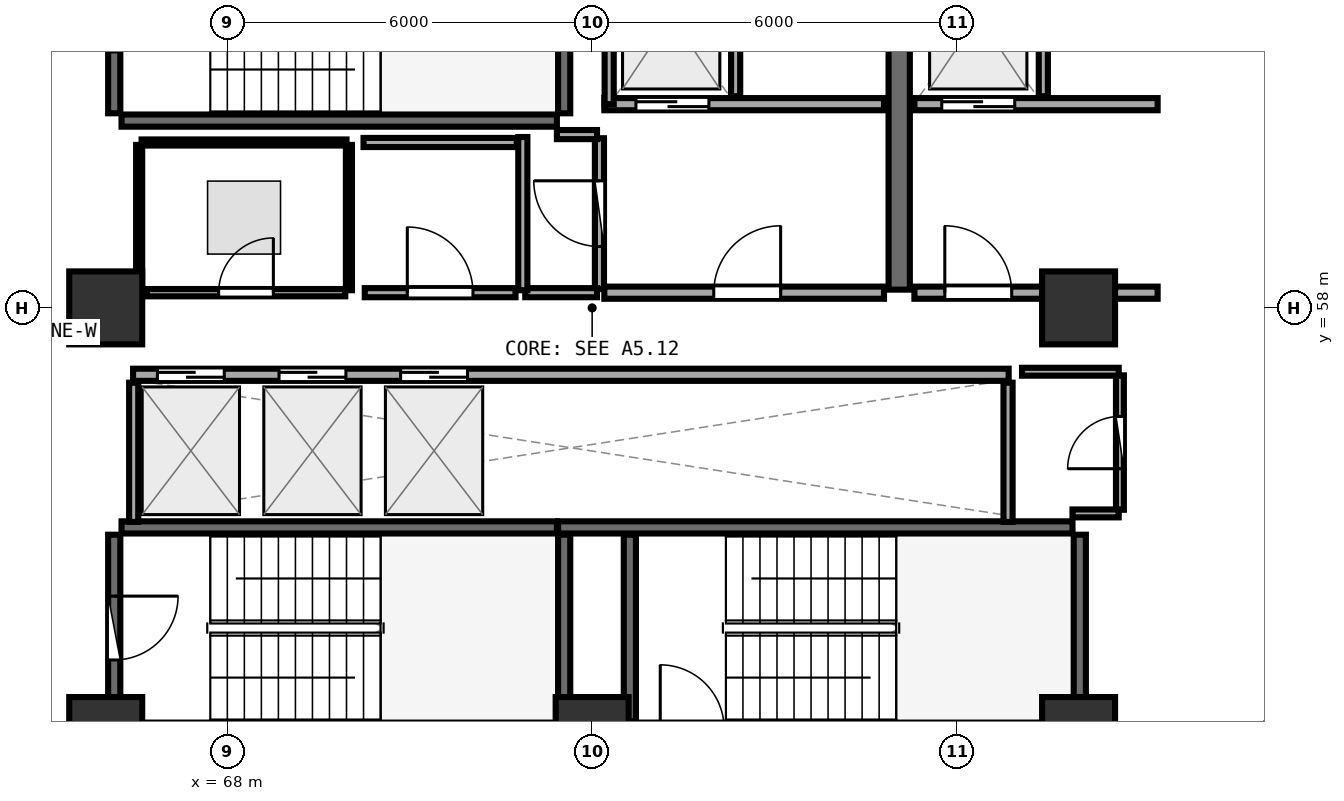
"""IFC4 building model, lengths in metres.
Left out: names, types, materials, properties, quantities, classifications, styles, units other than length and angle.
Written with IfcOpenShell. Run it as: python <this file> out.ifc"""

import sys

from ifc_helpers import new_model, si_unit, direction, frame, frame_2d, origin, origin_2d, place, context, subcontext, project, spatial, rectangle, extrude, element, fill, save


model = new_model("IFC4")
c1 = context("Model", 3, precision=1e-05, world=origin(), true_north=direction((0.0, 1.0)))
c2 = subcontext(c1, "Body", "Model", "MODEL_VIEW")
j1 = project(units=[si_unit("LENGTHUNIT", "METRE"), si_unit("PLANEANGLEUNIT", "RADIAN")], contexts=[c1])
p1 = place(None, origin())
s1 = spatial("IfcSite", under=j1, at=p1, CompositionType="ELEMENT")
p2 = place(p1, origin())
s2 = spatial("IfcBuilding", under=s1, at=p2, CompositionType="ELEMENT")
p3 = place(p2, frame((0.0, 0.0, 165.6)))
s3 = spatial("IfcBuildingStorey", under=s2, at=p3, CompositionType="ELEMENT", Elevation=165.6)
for number, where, z_axis, x_axis in (
    (1, (66.0, 51.0, 0.0), (0.0, 0.0, 1.0), (1.0, 0.0, 0.0)),
    (2, (74.0, 51.0, 0.0), (0.0, 0.0, 1.0), (1.0, 0.0, 0.0)),
    (3, (82.0, 51.0, 0.0), (0.0, 0.0, 1.0), (1.0, 0.0, 0.0)),
    (4, (82.0, 58.0, 0.0), (0.0, 0.0, 1.0), (1.0, 0.0, 0.0)),
    (5, (66.0, 58.0, 0.0), (0.0, 0.0, 1.0), (1.0, 0.0, 0.0)),
):
    element("IfcColumn", number, at=place(p3, frame(where, z_axis=z_axis, x_axis=x_axis)), inside=s3, PredefinedType="PILASTER", context=c2, shape_type="SweptSolid", body=[
        extrude(rectangle(XDim=1.2, YDim=1.2, at=origin_2d()), origin(), (0.0, 0.0, 1.0), 3.75),
    ])
p4 = place(p3, frame((66.26, 61.08, 0.0), z_axis=(0.0, 0.0, 1.0), x_axis=(1.0, 0.0, 0.0)))
e6 = element("IfcWall", 6, at=p4, inside=s3, PredefinedType="SHEAR", context=c2, shape_type="SweptSolid", body=[
    extrude(rectangle(XDim=7.16, YDim=0.2, at=frame_2d((3.58, 0.0))), origin(), (0.0, 0.0, 1.0), 3.49),
])
p5 = place(p3, frame((73.54, 61.2, 0.0), z_axis=(0.0, 0.0, 1.0), x_axis=(0.0, 1.0, 0.0)))
e7 = element("IfcWall", 7, at=p5, inside=s3, PredefinedType="SHEAR", context=c2, shape_type="SweptSolid", body=[
    extrude(rectangle(XDim=3.07, YDim=0.2, at=frame_2d((1.535, 0.0))), origin(), (0.0, 0.0, 1.0), 3.49),
])
p6 = place(p3, frame((66.14, 64.27, 0.0), z_axis=(0.0, 0.0, 1.0), x_axis=(0.0, -1.0, 0.0)))
e8 = element("IfcWall", 8, at=p6, inside=s3, PredefinedType="SHEAR", context=c2, shape_type="SweptSolid", body=[
    extrude(rectangle(XDim=3.07, YDim=0.2, at=frame_2d((1.535, 0.0))), origin(), (0.0, 0.0, 1.0), 3.49),
])
p7 = place(p6, frame((1.01, 0.0, 0.0)))
e9 = element("IfcOpeningElement", 9, at=p7, cuts=e8, PredefinedType="OPENING", context=c2, shape_type="SweptSolid", body=[
    extrude(rectangle(XDim=1.05, YDim=2.1, at=frame_2d((0.525, 1.05))), frame((0.0, 0.11, 0.0), z_axis=(0.0, -1.0, 0.0), x_axis=(1.0, 0.0, 0.0)), (0.0, 0.0, 1.0), 0.22),
])
p8 = place(p3, frame((82.02, 51.2, 0.0), z_axis=(0.0, 0.0, 1.0), x_axis=(0.0, 1.0, 0.0)))
e10 = element("IfcWall", 10, at=p8, inside=s3, PredefinedType="SHEAR", context=c2, shape_type="SweptSolid", body=[
    extrude(rectangle(XDim=3.07, YDim=0.2, at=frame_2d((1.535, 0.0))), origin(), (0.0, 0.0, 1.0), 3.49),
])
p9 = place(p3, frame((81.9, 54.39, 0.0), z_axis=(0.0, 0.0, 1.0), x_axis=(-1.0, 0.0, 0.0)))
e11 = element("IfcWall", 11, at=p9, inside=s3, PredefinedType="SHEAR", context=c2, shape_type="SweptSolid", body=[
    extrude(rectangle(XDim=8.46, YDim=0.2, at=frame_2d((4.23, 0.0))), origin(), (0.0, 0.0, 1.0), 3.49),
])
for number, where, z_axis, x_axis in (
    (12, (74.62, 54.27, 0.0), (0.0, 0.0, 1.0), (0.0, -1.0, 0.0)),
    (13, (73.54, 51.2, 0.0), (0.0, 0.0, 1.0), (0.0, 1.0, 0.0)),
):
    element("IfcWall", number, at=place(p3, frame(where, z_axis=z_axis, x_axis=x_axis)), inside=s3, PredefinedType="SHEAR", context=c2, shape_type="SweptSolid", body=[
        extrude(rectangle(XDim=3.07, YDim=0.2, at=frame_2d((1.535, 0.0))), origin(), (0.0, 0.0, 1.0), 3.49),
    ])
p10 = place(p3, frame((73.42, 54.39, 0.0), z_axis=(0.0, 0.0, 1.0), x_axis=(-1.0, 0.0, 0.0)))
e14 = element("IfcWall", 14, at=p10, inside=s3, PredefinedType="SHEAR", context=c2, shape_type="SweptSolid", body=[
    extrude(rectangle(XDim=7.16, YDim=0.2, at=frame_2d((3.58, 0.0))), origin(), (0.0, 0.0, 1.0), 3.49),
])
p11 = place(p3, frame((66.14, 54.27, 0.0), z_axis=(0.0, 0.0, 1.0), x_axis=(0.0, -1.0, 0.0)))
e15 = element("IfcWall", 15, at=p11, inside=s3, PredefinedType="SHEAR", context=c2, shape_type="SweptSolid", body=[
    extrude(rectangle(XDim=3.07, YDim=0.2, at=frame_2d((1.535, 0.0))), origin(), (0.0, 0.0, 1.0), 3.49),
])
p12 = place(p11, frame((1.01, 0.0, 0.0)))
e16 = element("IfcOpeningElement", 16, at=p12, cuts=e15, PredefinedType="OPENING", context=c2, shape_type="SweptSolid", body=[
    extrude(rectangle(XDim=1.05, YDim=2.1, at=frame_2d((0.525, 1.05))), frame((0.0, 0.11, 0.0), z_axis=(0.0, -1.0, 0.0), x_axis=(1.0, 0.0, 0.0)), (0.0, 0.0, 1.0), 0.22),
])
p13 = place(p3, frame((79.05, 58.3, 0.0), z_axis=(0.0, 0.0, 1.0), x_axis=(0.0, 1.0, 0.0)))
e17 = element("IfcWall", 17, at=p13, inside=s3, PredefinedType="SHEAR", context=c2, shape_type="SweptSolid", body=[
    extrude(rectangle(XDim=6.3, YDim=0.35, at=frame_2d((3.15, 0.0))), origin(), (0.0, 0.0, 1.0), 3.49),
])
p14 = place(p3, frame((74.2, 61.35, 0.0), z_axis=(0.0, 0.0, 1.0), x_axis=(1.0, 0.0, 0.0)))
e18 = element("IfcWall", 18, at=p14, inside=s3, PredefinedType="SOLIDWALL", context=c2, shape_type="SweptSolid", body=[
    extrude(rectangle(XDim=4.6, YDim=0.2, at=frame_2d((2.3, 0.0))), origin(), (0.0, 0.0, 1.0), 3.48),
])
p15 = place(p14, frame((0.52, 0.0, 0.0)))
e19 = element("IfcOpeningElement", 19, at=p15, cuts=e18, PredefinedType="OPENING", context=c2, shape_type="SweptSolid", body=[
    extrude(rectangle(XDim=1.2, YDim=2.15, at=frame_2d((0.6, 1.075))), frame((0.0, 0.11, 0.0), z_axis=(0.0, -1.0, 0.0), x_axis=(1.0, 0.0, 0.0)), (0.0, 0.0, 1.0), 0.22),
])
p16 = place(p3, frame((74.28, 61.35, 0.0), z_axis=(0.0, 0.0, 1.0), x_axis=(0.0, 1.0, 0.0)))
e20 = element("IfcWall", 20, at=p16, inside=s3, PredefinedType="PARTITIONING", context=c2, shape_type="SweptSolid", body=[
    extrude(rectangle(XDim=2.97, YDim=0.15, at=frame_2d((1.485, 0.0))), origin(), (0.0, 0.0, 1.0), 3.48),
])
p17 = place(p3, frame((76.36, 61.48, 0.0), z_axis=(0.0, 0.0, 1.0), x_axis=(0.0, 1.0, 0.0)))
e21 = element("IfcWall", 21, at=p17, inside=s3, PredefinedType="PARTITIONING", context=c2, shape_type="SweptSolid", body=[
    extrude(rectangle(XDim=2.84, YDim=0.15, at=frame_2d((1.42, 0.0))), origin(), (0.0, 0.0, 1.0), 3.48),
])
p18 = place(p3, frame((79.3, 61.35, 0.0), z_axis=(0.0, 0.0, 1.0), x_axis=(1.0, 0.0, 0.0)))
e22 = element("IfcWall", 22, at=p18, inside=s3, PredefinedType="SOLIDWALL", context=c2, shape_type="SweptSolid", body=[
    extrude(rectangle(XDim=4.0, YDim=0.2, at=frame_2d((2.0, 0.0))), origin(), (0.0, 0.0, 1.0), 2.775),
])
p19 = place(p18, frame((0.45, 0.0, 0.0)))
e23 = element("IfcOpeningElement", 23, at=p19, cuts=e22, PredefinedType="OPENING", context=c2, shape_type="SweptSolid", body=[
    extrude(rectangle(XDim=1.2, YDim=2.15, at=frame_2d((0.6, 1.075))), frame((0.0, 0.11, 0.0), z_axis=(0.0, -1.0, 0.0), x_axis=(1.0, 0.0, 0.0)), (0.0, 0.0, 1.0), 0.22),
])
p20 = place(p3, frame((81.42, 61.48, 0.0), z_axis=(0.0, 0.0, 1.0), x_axis=(0.0, 1.0, 0.0)))
e24 = element("IfcWall", 24, at=p20, inside=s3, PredefinedType="PARTITIONING", context=c2, shape_type="SweptSolid", body=[
    extrude(rectangle(XDim=2.84, YDim=0.15, at=frame_2d((1.42, 0.0))), origin(), (0.0, 0.0, 1.0), 3.48),
])
p21 = place(p3, frame((74.2, 58.25, 0.0), z_axis=(0.0, 0.0, 1.0), x_axis=(1.0, 0.0, 0.0)))
e25 = element("IfcWall", 25, at=p21, inside=s3, PredefinedType="SOLIDWALL", context=c2, shape_type="SweptSolid", body=[
    extrude(rectangle(XDim=4.6, YDim=0.2, at=frame_2d((2.3, 0.0))), origin(), (0.0, 0.0, 1.0), 3.48),
])
p22 = place(p21, frame((1.8, 0.0, 0.0)))
e26 = element("IfcOpeningElement", 26, at=p22, cuts=e25, PredefinedType="OPENING", context=c2, shape_type="SweptSolid", body=[
    extrude(rectangle(XDim=1.1, YDim=2.1, at=frame_2d((0.55, 1.05))), frame((0.0, 0.11, 0.0), z_axis=(0.0, -1.0, 0.0), x_axis=(1.0, 0.0, 0.0)), (0.0, 0.0, 1.0), 0.22),
])
p23 = place(p3, frame((79.3, 58.25, 0.0), z_axis=(0.0, 0.0, 1.0), x_axis=(1.0, 0.0, 0.0)))
e27 = element("IfcWall", 27, at=p23, inside=s3, PredefinedType="SOLIDWALL", context=c2, shape_type="SweptSolid", body=[
    extrude(rectangle(XDim=4.0, YDim=0.2, at=frame_2d((2.0, 0.0))), origin(), (0.0, 0.0, 1.0), 2.775),
])
p24 = place(p23, frame((0.5, 0.0, 0.0)))
e28 = element("IfcOpeningElement", 28, at=p24, cuts=e27, PredefinedType="OPENING", context=c2, shape_type="SweptSolid", body=[
    extrude(rectangle(XDim=1.1, YDim=2.1, at=frame_2d((0.55, 1.05))), frame((0.0, 0.11, 0.0), z_axis=(0.0, -1.0, 0.0), x_axis=(1.0, 0.0, 0.0)), (0.0, 0.0, 1.0), 0.22),
])
p25 = place(p3, frame((66.45, 56.9, 0.0), z_axis=(0.0, 0.0, 1.0), x_axis=(1.0, 0.0, 0.0)))
e29 = element("IfcWall", 29, at=p25, inside=s3, PredefinedType="SOLIDWALL", context=c2, shape_type="SweptSolid", body=[
    extrude(rectangle(XDim=14.4, YDim=0.2, at=frame_2d((7.2, 0.0))), origin(), (0.0, 0.0, 1.0), 3.48),
])
p26 = place(p25, frame((0.4, 0.0, 0.0)))
e30 = element("IfcOpeningElement", 30, at=p26, cuts=e29, PredefinedType="OPENING", context=c2, shape_type="SweptSolid", body=[
    extrude(rectangle(XDim=1.1, YDim=2.1, at=frame_2d((0.55, 1.05))), frame((0.0, 0.11, 0.0), z_axis=(0.0, -1.0, 0.0), x_axis=(1.0, 0.0, 0.0)), (0.0, 0.0, 1.0), 0.22),
])
p27 = place(p25, frame((2.4, 0.0, 0.0)))
e31 = element("IfcOpeningElement", 31, at=p27, cuts=e29, PredefinedType="OPENING", context=c2, shape_type="SweptSolid", body=[
    extrude(rectangle(XDim=1.1, YDim=2.1, at=frame_2d((0.55, 1.05))), frame((0.0, 0.11, 0.0), z_axis=(0.0, -1.0, 0.0), x_axis=(1.0, 0.0, 0.0)), (0.0, 0.0, 1.0), 0.22),
])
p28 = place(p25, frame((4.4, 0.0, 0.0)))
e32 = element("IfcOpeningElement", 32, at=p28, cuts=e29, PredefinedType="OPENING", context=c2, shape_type="SweptSolid", body=[
    extrude(rectangle(XDim=1.1, YDim=2.1, at=frame_2d((0.55, 1.05))), frame((0.0, 0.11, 0.0), z_axis=(0.0, -1.0, 0.0), x_axis=(1.0, 0.0, 0.0)), (0.0, 0.0, 1.0), 0.22),
])
for number, where, z_axis, x_axis in (
    (33, (66.46, 54.48, 0.0), (0.0, 0.0, 1.0), (0.0, 1.0, 0.0)),
    (34, (80.84, 54.48, 0.0), (0.0, 0.0, 1.0), (0.0, 1.0, 0.0)),
):
    element("IfcWall", number, at=place(p3, frame(where, z_axis=z_axis, x_axis=x_axis)), inside=s3, PredefinedType="PARTITIONING", context=c2, shape_type="SweptSolid", body=[
        extrude(rectangle(XDim=2.29, YDim=0.15, at=frame_2d((1.145, 0.0))), origin(), (0.0, 0.0, 1.0), 3.48),
    ])
p29 = place(p3, frame((74.12, 58.31, 0.0), z_axis=(0.0, 0.0, 1.0), x_axis=(0.0, 1.0, 0.0)))
e35 = element("IfcWall", 35, at=p29, inside=s3, PredefinedType="PARTITIONING", context=c2, shape_type="SweptSolid", body=[
    extrude(rectangle(XDim=2.48, YDim=0.15, at=frame_2d((1.24, 0.0))), origin(), (0.0, 0.0, 1.0), 3.48),
])
p30 = place(p29, frame((0.7, 0.0, 0.0)))
e36 = element("IfcOpeningElement", 36, at=p30, cuts=e35, PredefinedType="OPENING", context=c2, shape_type="SweptSolid", body=[
    extrude(rectangle(XDim=1.08, YDim=2.1, at=frame_2d((0.54, 1.05))), frame((0.0, 0.085, 0.0), z_axis=(0.0, -1.0, 0.0), x_axis=(1.0, 0.0, 0.0)), (0.0, 0.0, 1.0), 0.17),
])
p31 = place(p3, frame((82.68, 54.68, 0.0), z_axis=(0.0, 0.0, 1.0), x_axis=(0.0, 1.0, 0.0)))
e37 = element("IfcWall", 37, at=p31, inside=s3, PredefinedType="PLUMBINGWALL", context=c2, shape_type="SweptSolid", body=[
    extrude(rectangle(XDim=2.21, YDim=0.13, at=frame_2d((1.105, 0.0))), origin(), (0.0, 0.0, 1.0), 3.48),
])
p32 = place(p31, frame((0.675, 0.0, 0.0)))
e38 = element("IfcOpeningElement", 38, at=p32, cuts=e37, PredefinedType="OPENING", context=c2, shape_type="SweptSolid", body=[
    extrude(rectangle(XDim=0.86, YDim=2.05, at=frame_2d((0.43, 1.025))), frame((0.0, 0.075, 0.0), z_axis=(0.0, -1.0, 0.0), x_axis=(1.0, 0.0, 0.0)), (0.0, 0.0, 1.0), 0.15),
])
p33 = place(p3, frame((66.675, 58.25, 0.0), z_axis=(0.0, 0.0, 1.0), x_axis=(1.0, 0.0, 0.0)))
e39 = element("IfcWall", 39, at=p33, inside=s3, PredefinedType="PARTITIONING", context=c2, shape_type="SweptSolid", body=[
    extrude(rectangle(XDim=3.265, YDim=0.12, at=frame_2d((1.632, 0.0))), origin(), (0.0, 0.0, 1.0), 3.48),
])
p34 = place(p33, frame((1.182, 0.0, 0.0)))
e40 = element("IfcOpeningElement", 40, at=p34, cuts=e39, PredefinedType="OPENING", context=c2, shape_type="SweptSolid", body=[
    extrude(rectangle(XDim=0.9, YDim=2.08, at=frame_2d((0.45, 1.04))), frame((0.0, 0.07, 0.0), z_axis=(0.0, -1.0, 0.0), x_axis=(1.0, 0.0, 0.0)), (0.0, 0.0, 1.0), 0.14),
])
p35 = place(p3, frame((70.26, 58.25, 0.0), z_axis=(0.0, 0.0, 1.0), x_axis=(1.0, 0.0, 0.0)))
e41 = element("IfcWall", 41, at=p35, inside=s3, PredefinedType="PARTITIONING", context=c2, shape_type="SweptSolid", body=[
    extrude(rectangle(XDim=2.48, YDim=0.15, at=frame_2d((1.24, 0.0))), origin(), (0.0, 0.0, 1.0), 3.48),
])
p36 = place(p35, frame((0.7, 0.0, 0.0)))
e42 = element("IfcOpeningElement", 42, at=p36, cuts=e41, PredefinedType="OPENING", context=c2, shape_type="SweptSolid", body=[
    extrude(rectangle(XDim=1.08, YDim=2.1, at=frame_2d((0.54, 1.05))), frame((0.0, 0.085, 0.0), z_axis=(0.0, -1.0, 0.0), x_axis=(1.0, 0.0, 0.0)), (0.0, 0.0, 1.0), 0.17),
])
p37 = place(p3, frame((72.9, 58.25, 0.0), z_axis=(0.0, 0.0, 1.0), x_axis=(1.0, 0.0, 0.0)))
e43 = element("IfcWall", 43, at=p37, inside=s3, PredefinedType="PARTITIONING", context=c2, shape_type="SweptSolid", body=[
    extrude(rectangle(XDim=1.18, YDim=0.15, at=frame_2d((0.59, 0.0))), origin(), (0.0, 0.0, 1.0), 3.48),
])
p38 = place(p3, frame((74.08, 60.85, 0.0), z_axis=(0.0, 0.0, 1.0), x_axis=(-1.0, 0.0, 0.0)))
e44 = element("IfcWall", 44, at=p38, inside=s3, PredefinedType="PARTITIONING", context=c2, shape_type="SweptSolid", body=[
    extrude(rectangle(XDim=0.66, YDim=0.15, at=frame_2d((0.33, 0.0))), origin(), (0.0, 0.0, 1.0), 3.48),
])
p39 = place(p3, frame((72.86, 60.81, 0.0), z_axis=(0.0, 0.0, 1.0), x_axis=(0.0, -1.0, 0.0)))
e45 = element("IfcWall", 45, at=p39, inside=s3, PredefinedType="PARTITIONING", context=c2, shape_type="SweptSolid", body=[
    extrude(rectangle(XDim=2.52, YDim=0.15, at=frame_2d((1.26, 0.0))), origin(), (0.0, 0.0, 1.0), 3.48),
])
p40 = place(p3, frame((81.9, 54.62, 0.0), z_axis=(0.0, 0.0, 1.0), x_axis=(1.0, 0.0, 0.0)))
e46 = element("IfcWall", 46, at=p40, inside=s3, PredefinedType="PLUMBINGWALL", context=c2, shape_type="SweptSolid", body=[
    extrude(rectangle(XDim=0.76, YDim=0.13, at=frame_2d((0.38, 0.0))), origin(), (0.0, 0.0, 1.0), 2.775),
])
p41 = place(p3, frame((82.66, 56.95, 0.0), z_axis=(0.0, 0.0, 1.0), x_axis=(-1.0, 0.0, 0.0)))
e47 = element("IfcWall", 47, at=p41, inside=s3, PredefinedType="PLUMBINGWALL", context=c2, shape_type="SweptSolid", body=[
    extrude(rectangle(XDim=1.59, YDim=0.13, at=frame_2d((0.795, 0.0))), origin(), (0.0, 0.0, 1.0), 2.775),
])
p42 = place(p3, frame((70.0, 58.29, 0.0), z_axis=(0.0, 0.0, 1.0), x_axis=(0.0, 1.0, 0.0)))
e48 = element("IfcWall", 48, at=p42, inside=s3, PredefinedType="PARTITIONING", context=c2, shape_type="SweptSolid", body=[
    extrude(rectangle(XDim=2.39, YDim=0.1, at=frame_2d((1.195, 0.0))), origin(), (0.0, 0.0, 1.0), 3.48),
])
p43 = place(p3, frame((69.96, 60.72, 0.0), z_axis=(0.0, 0.0, 1.0), x_axis=(-1.0, 0.0, 0.0)))
e49 = element("IfcWall", 49, at=p43, inside=s3, PredefinedType="PARTITIONING", context=c2, shape_type="SweptSolid", body=[
    extrude(rectangle(XDim=3.37, YDim=0.1, at=frame_2d((1.685, 0.0))), origin(), (0.0, 0.0, 1.0), 3.48),
])
p44 = place(p3, frame((66.55, 60.68, 0.0), z_axis=(0.0, 0.0, 1.0), x_axis=(0.0, -1.0, 0.0)))
e50 = element("IfcWall", 50, at=p44, inside=s3, PredefinedType="PARTITIONING", context=c2, shape_type="SweptSolid", body=[
    extrude(rectangle(XDim=2.383, YDim=0.1, at=frame_2d((1.191, 0.0))), origin(), (0.0, 0.0, 1.0), 3.48),
])
p45 = place(p3, frame((72.76, 60.72, 0.0), z_axis=(0.0, 0.0, 1.0), x_axis=(-1.0, 0.0, 0.0)))
e51 = element("IfcWall", 51, at=p45, inside=s3, PredefinedType="PARTITIONING", context=c2, shape_type="SweptSolid", body=[
    extrude(rectangle(XDim=2.52, YDim=0.15, at=frame_2d((1.26, 0.0))), origin(), (0.0, 0.0, 1.0), 3.48),
])
p46 = place(p3, frame((81.722, 47.699, 0.0), z_axis=(0.0, 0.0, 1.0), x_axis=(0.701417862724, 0.712750294179, 0.0)))
e52 = element("IfcWall", 52, at=p46, inside=s3, PredefinedType="PARTITIONING", context=c2, shape_type="SweptSolid", body=[
    extrude(rectangle(XDim=6.549, YDim=0.1, at=frame_2d((3.275, 0.0))), origin(), (0.0, 0.0, 1.0), 2.975),
])
p47 = place(p12, origin())
e53 = element("IfcDoor", 53, at=p47, inside=s3, OperationType="SINGLE_SWING_LEFT", PredefinedType="DOOR", context=c2, shape_type="SweptSolid", body=[
    extrude(rectangle(XDim=1.05, YDim=2.1, at=frame_2d((0.525, 1.05))), frame((0.0, 0.025, 0.0), z_axis=(0.0, -1.0, 0.0), x_axis=(1.0, 0.0, 0.0)), (0.0, 0.0, 1.0), 0.05),
])
fill(e16, e53)
p48 = place(p15, origin())
e54 = element("IfcDoor", 54, at=p48, inside=s3, OperationType="DOUBLE_DOOR_SLIDING", PredefinedType="DOOR", context=c2, shape_type="SweptSolid", body=[
    extrude(rectangle(XDim=1.2, YDim=2.15, at=frame_2d((0.6, 1.075))), frame((0.0, 0.025, 0.0), z_axis=(0.0, -1.0, 0.0), x_axis=(1.0, 0.0, 0.0)), (0.0, 0.0, 1.0), 0.05),
])
fill(e19, e54)
p49 = place(p19, origin())
e55 = element("IfcDoor", 55, at=p49, inside=s3, OperationType="DOUBLE_DOOR_SLIDING", PredefinedType="DOOR", context=c2, shape_type="SweptSolid", body=[
    extrude(rectangle(XDim=1.2, YDim=2.15, at=frame_2d((0.6, 1.075))), frame((0.0, 0.025, 0.0), z_axis=(0.0, -1.0, 0.0), x_axis=(1.0, 0.0, 0.0)), (0.0, 0.0, 1.0), 0.05),
])
fill(e23, e55)
p50 = place(p22, frame((1.1, 0.0, 0.0), z_axis=(0.0, 0.0, 1.0), x_axis=(-1.0, 0.0, 0.0)))
e56 = element("IfcDoor", 56, at=p50, inside=s3, OperationType="SINGLE_SWING_LEFT", PredefinedType="DOOR", context=c2, shape_type="SweptSolid", body=[
    extrude(rectangle(XDim=1.1, YDim=2.1, at=frame_2d((0.55, 1.05))), frame((0.0, 0.025, 0.0), z_axis=(0.0, -1.0, 0.0), x_axis=(1.0, 0.0, 0.0)), (0.0, 0.0, 1.0), 0.05),
])
fill(e26, e56)
p51 = place(p24, frame((1.1, 0.0, 0.0), z_axis=(0.0, 0.0, 1.0), x_axis=(-1.0, 0.0, 0.0)))
e57 = element("IfcDoor", 57, at=p51, inside=s3, OperationType="SINGLE_SWING_RIGHT", PredefinedType="DOOR", context=c2, shape_type="SweptSolid", body=[
    extrude(rectangle(XDim=1.1, YDim=2.1, at=frame_2d((0.55, 1.05))), frame((0.0, 0.025, 0.0), z_axis=(0.0, -1.0, 0.0), x_axis=(1.0, 0.0, 0.0)), (0.0, 0.0, 1.0), 0.05),
])
fill(e28, e57)
p52 = place(p26, origin())
e58 = element("IfcDoor", 58, at=p52, inside=s3, OperationType="DOUBLE_DOOR_SLIDING", PredefinedType="DOOR", context=c2, shape_type="SweptSolid", body=[
    extrude(rectangle(XDim=1.1, YDim=2.1, at=frame_2d((0.55, 1.05))), frame((0.0, 0.025, 0.0), z_axis=(0.0, -1.0, 0.0), x_axis=(1.0, 0.0, 0.0)), (0.0, 0.0, 1.0), 0.05),
])
fill(e30, e58)
p53 = place(p27, origin())
e59 = element("IfcDoor", 59, at=p53, inside=s3, OperationType="DOUBLE_DOOR_SLIDING", PredefinedType="DOOR", context=c2, shape_type="SweptSolid", body=[
    extrude(rectangle(XDim=1.1, YDim=2.1, at=frame_2d((0.55, 1.05))), frame((0.0, 0.025, 0.0), z_axis=(0.0, -1.0, 0.0), x_axis=(1.0, 0.0, 0.0)), (0.0, 0.0, 1.0), 0.05),
])
fill(e31, e59)
p54 = place(p28, origin())
e60 = element("IfcDoor", 60, at=p54, inside=s3, OperationType="DOUBLE_DOOR_SLIDING", PredefinedType="DOOR", context=c2, shape_type="SweptSolid", body=[
    extrude(rectangle(XDim=1.1, YDim=2.1, at=frame_2d((0.55, 1.05))), frame((0.0, 0.025, 0.0), z_axis=(0.0, -1.0, 0.0), x_axis=(1.0, 0.0, 0.0)), (0.0, 0.0, 1.0), 0.05),
])
fill(e32, e60)
p55 = place(p30, origin())
e61 = element("IfcDoor", 61, at=p55, inside=s3, OperationType="SINGLE_SWING_RIGHT", PredefinedType="DOOR", context=c2, shape_type="SweptSolid", body=[
    extrude(rectangle(XDim=1.08, YDim=2.1, at=frame_2d((0.54, 1.05))), frame((0.0, 0.025, 0.0), z_axis=(0.0, -1.0, 0.0), x_axis=(1.0, 0.0, 0.0)), (0.0, 0.0, 1.0), 0.05),
])
fill(e36, e61)
p56 = place(p32, origin())
e62 = element("IfcDoor", 62, at=p56, inside=s3, OperationType="SINGLE_SWING_LEFT", PredefinedType="DOOR", context=c2, shape_type="SweptSolid", body=[
    extrude(rectangle(XDim=0.86, YDim=2.05, at=frame_2d((0.43, 1.025))), frame((0.0, 0.025, 0.0), z_axis=(0.0, -1.0, 0.0), x_axis=(1.0, 0.0, 0.0)), (0.0, 0.0, 1.0), 0.05),
])
fill(e38, e62)
p57 = place(p34, origin())
e63 = element("IfcDoor", 63, at=p57, inside=s3, OperationType="SINGLE_SWING_RIGHT", PredefinedType="DOOR", context=c2, shape_type="SweptSolid", body=[
    extrude(rectangle(XDim=0.9, YDim=2.08, at=frame_2d((0.45, 1.04))), frame((0.0, 0.025, 0.0), z_axis=(0.0, -1.0, 0.0), x_axis=(1.0, 0.0, 0.0)), (0.0, 0.0, 1.0), 0.05),
])
fill(e40, e63)
p58 = place(p36, origin())
e64 = element("IfcDoor", 64, at=p58, inside=s3, OperationType="SINGLE_SWING_LEFT", PredefinedType="DOOR", context=c2, shape_type="SweptSolid", body=[
    extrude(rectangle(XDim=1.08, YDim=2.1, at=frame_2d((0.54, 1.05))), frame((0.0, 0.025, 0.0), z_axis=(0.0, -1.0, 0.0), x_axis=(1.0, 0.0, 0.0)), (0.0, 0.0, 1.0), 0.05),
])
fill(e42, e64)
save(model, sys.argv[1])
